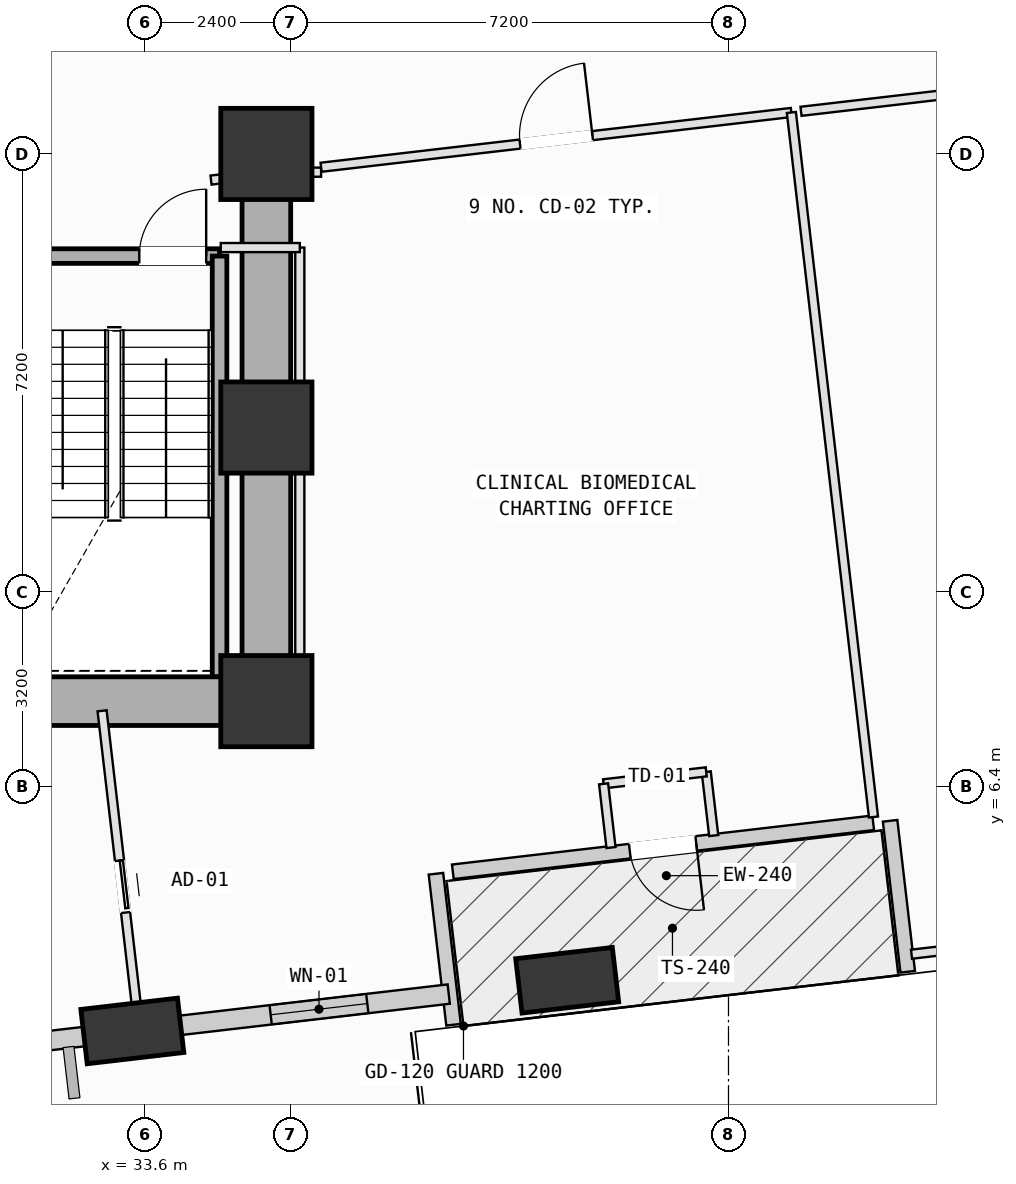
"""IFC4 building model, lengths in metres.
Left out: names, types, materials, properties, quantities, classifications, styles, units other than length and angle.
Written with IfcOpenShell. Run it as: python <this file> out.ifc"""

import sys

from ifc_helpers import new_model, si_unit, direction, frame, frame_2d, origin, origin_2d, place, context, subcontext, project, spatial, rectangle, extrude, element, fill, save


model = new_model("IFC4")
c1 = context("Model", 3, precision=1e-05, world=origin(), true_north=direction((0.0, 1.0)))
c2 = subcontext(c1, "Body", "Model", "MODEL_VIEW")
j1 = project(units=[si_unit("LENGTHUNIT", "METRE"), si_unit("PLANEANGLEUNIT", "RADIAN")], contexts=[c1])
p1 = place(None, origin())
s1 = spatial("IfcSite", under=j1, at=p1, CompositionType="ELEMENT")
p2 = place(p1, origin())
s2 = spatial("IfcBuilding", under=s1, at=p2, CompositionType="ELEMENT")
p3 = place(p2, frame((0.0, 0.0, 51.0)))
s3 = spatial("IfcBuildingStorey", under=s2, at=p3, CompositionType="ELEMENT", Elevation=51.0)
for number, where, z_axis, x_axis in (
    (1, (35.6, 7.8, 0.0), (0.0, 0.0, 1.0), (1.0, 0.0, 0.0)),
    (2, (35.6, 12.3, 0.0), (0.0, 0.0, 1.0), (1.0, 0.0, 0.0)),
    (3, (35.6, 16.8, 0.0), (0.0, 0.0, 1.0), (1.0, 0.0, 0.0)),
):
    element("IfcColumn", number, at=place(p3, frame(where, z_axis=z_axis, x_axis=x_axis)), inside=s3, PredefinedType="COLUMN", context=c2, shape_type="SweptSolid", body=[
        extrude(rectangle(XDim=1.5, YDim=1.5, at=origin_2d()), origin(), (0.0, 0.0, 1.0), 4.0),
    ])
p4 = place(p3, frame((33.396, 2.375, 0.002), z_axis=(0.092515382804, -6.0825367e-05, 0.995711253449), x_axis=(-0.114654270311, 0.993347681302, 0.010713652585)))
e4 = element("IfcColumn", 4, at=p4, inside=s3, PredefinedType="COLUMN", context=c2, shape_type="SweptSolid", body=[
    extrude(rectangle(XDim=1.6, YDim=0.9, at=origin_2d()), origin(), (0.0, 0.0, 1.0), 4.014),
])
p5 = place(p3, frame((40.547, 3.209, 0.002), z_axis=(0.088856765696, 0.029436464474, 0.995609345953), x_axis=(-0.421803367053, 0.906622532137, 0.010839915315)))
e5 = element("IfcColumn", 5, at=p5, inside=s3, PredefinedType="COLUMN", context=c2, shape_type="SweptSolid", body=[
    extrude(rectangle(XDim=1.6, YDim=0.9, at=origin_2d()), origin(), (0.0, 0.0, 1.0), 4.014),
])
p6 = place(p3, frame((45.58, 5.8, 0.0), z_axis=(0.0, 0.0, 1.0), x_axis=(-0.993269328475, -0.115827635352, 0.0)))
e6 = element("IfcWall", 6, at=p6, inside=s3, PredefinedType="SOLIDWALL", context=c2, shape_type="SweptSolid", body=[
    extrude(rectangle(XDim=6.96, YDim=0.24, at=frame_2d((3.48, 0.0))), origin(), (0.0, 0.0, 1.0), 3.165),
])
p7 = place(p6, frame((2.93, 0.0, 0.0)))
e7 = element("IfcOpeningElement", 7, at=p7, cuts=e6, PredefinedType="OPENING", context=c2, shape_type="SweptSolid", body=[
    extrude(rectangle(XDim=1.1, YDim=2.15, at=frame_2d((0.55, 1.075))), frame((0.0, 0.13, 0.0), z_axis=(0.0, -1.0, 0.0), x_axis=(1.0, 0.0, 0.0)), (0.0, 0.0, 1.0), 0.26),
])
p8 = place(p3, frame((38.389, 4.961, 0.0), z_axis=(0.0, 0.0, 1.0), x_axis=(0.115810052607, -0.993271378685, 0.0)))
e8 = element("IfcWall", 8, at=p8, inside=s3, PredefinedType="SOLIDWALL", context=c2, shape_type="SweptSolid", body=[
    extrude(rectangle(XDim=2.5, YDim=0.24, at=frame_2d((1.25, 0.0))), origin(), (0.0, 0.0, 1.0), 3.165),
])
p9 = place(p3, frame((46.148, 3.349, 0.0), z_axis=(0.0, 0.0, 1.0), x_axis=(-0.115821286172, 0.993270068848, 0.0)))
e9 = element("IfcWall", 9, at=p9, inside=s3, PredefinedType="SOLIDWALL", context=c2, shape_type="SweptSolid", body=[
    extrude(rectangle(XDim=2.5, YDim=0.24, at=frame_2d((1.25, 0.0))), origin(), (0.0, 0.0, 1.0), 3.165),
])
p10 = place(p3, frame((32.976, 2.326, 0.0), z_axis=(0.0, 0.0, 1.0), x_axis=(-0.99327275312, -0.115798263844, 0.0)))
e10 = element("IfcWall", 10, at=p10, inside=s3, PredefinedType="SOLIDWALL", context=c2, shape_type="SweptSolid", body=[
    extrude(rectangle(XDim=5.99, YDim=0.32, at=frame_2d((2.995, 0.0))), origin(), (0.0, 0.0, 1.0), 3.165),
])
p11 = place(p10, frame((2.394, 0.0, 0.75)))
e11 = element("IfcOpeningElement", 11, at=p11, cuts=e10, PredefinedType="OPENING", context=c2, shape_type="SweptSolid", body=[
    extrude(rectangle(XDim=1.2, YDim=1.75, at=frame_2d((0.6, 0.875))), frame((0.0, 0.17, 0.0), z_axis=(0.0, -1.0, 0.0), x_axis=(1.0, 0.0, 0.0)), (0.0, 0.0, 1.0), 0.34),
])
p12 = place(p10, frame((4.256, 0.0, 0.75)))
e12 = element("IfcOpeningElement", 12, at=p12, cuts=e10, PredefinedType="OPENING", context=c2, shape_type="SweptSolid", body=[
    extrude(rectangle(XDim=1.2, YDim=1.75, at=frame_2d((0.6, 0.875))), frame((0.0, 0.17, 0.0), z_axis=(0.0, -1.0, 0.0), x_axis=(1.0, 0.0, 0.0)), (0.0, 0.0, 1.0), 0.34),
])
p13 = place(p3, frame((38.599, 2.982, 0.0), z_axis=(0.0, 0.0, 1.0), x_axis=(-0.993273351727, -0.115793129113, 0.0)))
e13 = element("IfcWall", 13, at=p13, inside=s3, PredefinedType="SOLIDWALL", context=c2, shape_type="SweptSolid", body=[
    extrude(rectangle(XDim=4.447, YDim=0.32, at=frame_2d((2.223, 0.0))), origin(), (0.0, 0.0, 1.0), 3.165),
])
p14 = place(p13, frame((1.348, 0.0, 0.75)))
e14 = element("IfcOpeningElement", 14, at=p14, cuts=e13, PredefinedType="OPENING", context=c2, shape_type="SweptSolid", body=[
    extrude(rectangle(XDim=1.6, YDim=1.95, at=frame_2d((0.8, 0.975))), frame((0.0, 0.17, 0.0), z_axis=(0.0, -1.0, 0.0), x_axis=(1.0, 0.0, 0.0)), (0.0, 0.0, 1.0), 0.34),
])
p15 = place(p3, frame((31.37, 15.12, 0.0), z_axis=(0.0, 0.0, 1.0), x_axis=(1.0, 0.0, 0.0)))
e15 = element("IfcWall", 15, at=p15, inside=s3, PredefinedType="SOLIDWALL", context=c2, shape_type="SweptSolid", body=[
    extrude(rectangle(XDim=3.46, YDim=0.24, at=frame_2d((1.73, 0.0))), origin(), (0.0, 0.0, 1.0), 3.78),
])
p16 = place(p15, frame((2.14, 0.0, 0.0)))
e16 = element("IfcOpeningElement", 16, at=p16, cuts=e15, PredefinedType="OPENING", context=c2, shape_type="SweptSolid", body=[
    extrude(rectangle(XDim=1.1, YDim=2.15, at=frame_2d((0.55, 1.075))), frame((0.0, 0.13, 0.0), z_axis=(0.0, -1.0, 0.0), x_axis=(1.0, 0.0, 0.0)), (0.0, 0.0, 1.0), 0.26),
])
p17 = place(p3, frame((34.83, 15.12, 0.0), z_axis=(0.0, 0.0, 1.0), x_axis=(0.0, -1.0, 0.0)))
e17 = element("IfcWall", 17, at=p17, inside=s3, PredefinedType="SOLIDWALL", context=c2, shape_type="SweptSolid", body=[
    extrude(rectangle(XDim=6.92, YDim=0.24, at=frame_2d((3.46, 0.0))), origin(), (0.0, 0.0, 1.0), 3.78),
])
p18 = place(p3, frame((24.8, 7.8, 0.0), z_axis=(0.0, 0.0, 1.0), x_axis=(1.0, 0.0, 0.0)))
e18 = element("IfcWall", 18, at=p18, inside=s3, PredefinedType="SHEAR", context=c2, shape_type="SweptSolid", body=[
    extrude(rectangle(XDim=10.8, YDim=0.8, at=frame_2d((5.4, 0.0))), origin(), (0.0, 0.0, 1.0), 3.78),
])
p19 = place(p3, frame((35.6, 7.8, 0.0), z_axis=(0.0, 0.0, 1.0), x_axis=(0.0, 1.0, 0.0)))
e19 = element("IfcWall", 19, at=p19, inside=s3, PredefinedType="SHEAR", context=c2, shape_type="SweptSolid", body=[
    extrude(rectangle(XDim=9.0, YDim=0.8, at=frame_2d((4.5, 0.0))), origin(), (0.0, 0.0, 1.0), 3.78),
])
p20 = place(p3, frame((33.536, 2.16, 0.0), z_axis=(0.0, 0.0, 1.0), x_axis=(-0.993323124869, -0.115365374356, 0.0)))
e20 = element("IfcWall", 20, at=p20, inside=s3, PredefinedType="PARTITIONING", context=c2, shape_type="SweptSolid", body=[
    extrude(rectangle(XDim=0.538, YDim=0.15, at=frame_2d((0.269, 0.0))), origin(), (0.0, 0.0, 1.0), 3.165),
])
p21 = place(p3, frame((32.898, 7.641, 0.0), z_axis=(0.0, 0.0, 1.0), x_axis=(0.115606435858, -0.99329509814, 0.0)))
e21 = element("IfcWall", 21, at=p21, inside=s3, PredefinedType="PARTITIONING", context=c2, shape_type="SweptSolid", body=[
    extrude(rectangle(XDim=5.518, YDim=0.15, at=frame_2d((2.759, 0.0))), origin(), (0.0, 0.0, 1.0), 3.78),
])
p22 = place(p21, frame((2.48, 0.0, 0.0)))
e22 = element("IfcOpeningElement", 22, at=p22, cuts=e21, PredefinedType="OPENING", context=c2, shape_type="SweptSolid", body=[
    extrude(rectangle(XDim=0.86, YDim=2.06, at=frame_2d((0.43, 1.03))), frame((0.0, 0.085, 0.0), z_axis=(0.0, -1.0, 0.0), x_axis=(1.0, 0.0, 0.0)), (0.0, 0.0, 1.0), 0.17),
])
p23 = place(p3, frame((35.6, 7.5, 0.0), z_axis=(0.0, 0.0, 1.0), x_axis=(1.0, 0.0, 0.0)))
e23 = element("IfcWall", 23, at=p23, inside=s3, PredefinedType="PARTITIONING", context=c2, shape_type="SweptSolid", body=[
    extrude(rectangle(XDim=0.55, YDim=0.15, at=frame_2d((0.275, 0.0))), origin(), (0.0, 0.0, 1.0), 3.78),
])
p24 = place(p3, frame((36.15, 7.5, 0.0), z_axis=(0.0, 0.0, 1.0), x_axis=(0.0, 1.0, 0.0)))
e24 = element("IfcWall", 24, at=p24, inside=s3, PredefinedType="PARTITIONING", context=c2, shape_type="SweptSolid", body=[
    extrude(rectangle(XDim=7.76, YDim=0.15, at=frame_2d((3.88, 0.0))), origin(), (0.0, 0.0, 1.0), 3.78),
])
p25 = place(p3, frame((36.15, 15.26, 0.0), z_axis=(0.0, 0.0, 1.0), x_axis=(-1.0, 0.0, 0.0)))
e25 = element("IfcWall", 25, at=p25, inside=s3, PredefinedType="PARTITIONING", context=c2, shape_type="SweptSolid", body=[
    extrude(rectangle(XDim=1.3, YDim=0.15, at=frame_2d((0.65, 0.0))), origin(), (0.0, 0.0, 1.0), 3.78),
])
p26 = place(p3, frame((34.69, 16.37, 0.0), z_axis=(0.0, 0.0, 1.0), x_axis=(0.993332795397, 0.115282078349, 0.0)))
e26 = element("IfcWall", 26, at=p26, inside=s3, PredefinedType="PARTITIONING", context=c2, shape_type="SweptSolid", body=[
    extrude(rectangle(XDim=1.127, YDim=0.15, at=frame_2d((0.563, 0.0))), origin(), (0.0, 0.0, 1.0), 2.865),
])
p27 = place(p3, frame((35.809, 16.5, 0.0), z_axis=(0.0, 0.0, 1.0), x_axis=(1.0, 0.0, 0.0)))
e27 = element("IfcWall", 27, at=p27, inside=s3, PredefinedType="PARTITIONING", context=c2, shape_type="SweptSolid", body=[
    extrude(rectangle(XDim=0.691, YDim=0.15, at=frame_2d((0.345, 0.0))), origin(), (0.0, 0.0, 1.0), 2.865),
])
p28 = place(p3, frame((36.5, 16.581, 0.0), z_axis=(0.0, 0.0, 1.0), x_axis=(0.993283935169, 0.115702308251, 0.0)))
e28 = element("IfcWall", 28, at=p28, inside=s3, PredefinedType="PARTITIONING", context=c2, shape_type="SweptSolid", body=[
    extrude(rectangle(XDim=7.786, YDim=0.15, at=frame_2d((3.893, 0.0))), origin(), (0.0, 0.0, 1.0), 3.78),
])
p29 = place(p28, frame((3.293, 0.0, 0.0)))
e29 = element("IfcOpeningElement", 29, at=p29, cuts=e28, PredefinedType="OPENING", context=c2, shape_type="SweptSolid", body=[
    extrude(rectangle(XDim=1.2, YDim=2.15, at=frame_2d((0.6, 1.075))), frame((0.0, 0.085, 0.0), z_axis=(0.0, -1.0, 0.0), x_axis=(1.0, 0.0, 0.0)), (0.0, 0.0, 1.0), 0.17),
])
p30 = place(p3, frame((44.234, 17.482, 0.0), z_axis=(0.0, 0.0, 1.0), x_axis=(0.115809127061, -0.993271486598, 0.0)))
e30 = element("IfcWall", 30, at=p30, inside=s3, PredefinedType="PARTITIONING", context=c2, shape_type="SweptSolid", body=[
    extrude(rectangle(XDim=11.667, YDim=0.15, at=frame_2d((5.833, 0.0))), origin(), (0.0, 0.0, 1.0), 3.78),
])
p31 = place(p3, frame((42.957, 5.589, 0.0), z_axis=(0.0, 0.0, 1.0), x_axis=(-0.116626428291, 0.993175853625, 0.0)))
e31 = element("IfcWall", 31, at=p31, inside=s3, PredefinedType="PARTITIONING", context=c2, shape_type="SweptSolid", body=[
    extrude(rectangle(XDim=1.055, YDim=0.15, at=frame_2d((0.527, 0.0))), origin(), (0.0, 0.0, 1.0), 3.78),
])
p32 = place(p3, frame((42.834, 6.637, 0.0), z_axis=(0.0, 0.0, 1.0), x_axis=(-0.993257074845, -0.115932666966, 0.0)))
e32 = element("IfcWall", 32, at=p32, inside=s3, PredefinedType="PARTITIONING", context=c2, shape_type="SweptSolid", body=[
    extrude(rectangle(XDim=1.699, YDim=0.15, at=frame_2d((0.85, 0.0))), origin(), (0.0, 0.0, 1.0), 3.78),
])
p33 = place(p3, frame((41.146, 6.44, 0.0), z_axis=(0.0, 0.0, 1.0), x_axis=(0.115713264087, -0.993282658922, 0.0)))
e33 = element("IfcWall", 33, at=p33, inside=s3, PredefinedType="PARTITIONING", context=c2, shape_type="SweptSolid", body=[
    extrude(rectangle(XDim=1.055, YDim=0.15, at=frame_2d((0.527, 0.0))), origin(), (0.0, 0.0, 1.0), 3.78),
])
p34 = place(p3, frame((34.209, 2.239, 0.0), z_axis=(0.0, 0.0, 1.0), x_axis=(-0.993240491089, -0.116074660716, 0.0)))
e34 = element("IfcWall", 34, at=p34, inside=s3, PredefinedType="PARTITIONING", context=c2, shape_type="SweptSolid", body=[
    extrude(rectangle(XDim=0.517, YDim=0.15, at=frame_2d((0.259, 0.0))), origin(), (0.0, 0.0, 1.0), 3.165),
])
p35 = place(p3, frame((44.393, 17.501, 0.0), z_axis=(0.0, 0.0, 1.0), x_axis=(0.993276639016, 0.115764927265, 0.0)))
e35 = element("IfcWall", 35, at=p35, inside=s3, PredefinedType="PARTITIONING", context=c2, shape_type="SweptSolid", body=[
    extrude(rectangle(XDim=12.24, YDim=0.15, at=frame_2d((6.12, 0.0))), origin(), (0.0, 0.0, 1.0), 3.78),
])
p36 = place(p35, frame((5.52, 0.0, 0.0)))
e36 = element("IfcOpeningElement", 36, at=p36, cuts=e35, PredefinedType="OPENING", context=c2, shape_type="SweptSolid", body=[
    extrude(rectangle(XDim=1.2, YDim=2.15, at=frame_2d((0.6, 1.075))), frame((0.0, 0.085, 0.0), z_axis=(0.0, -1.0, 0.0), x_axis=(1.0, 0.0, 0.0)), (0.0, 0.0, 1.0), 0.17),
])
p37 = place(p3, frame((48.504, 3.905, 0.0), z_axis=(0.0, 0.0, 1.0), x_axis=(-0.993289881522, -0.115651248445, 0.0)))
e37 = element("IfcWall", 37, at=p37, inside=s3, PredefinedType="PARTITIONING", context=c2, shape_type="SweptSolid", body=[
    extrude(rectangle(XDim=2.309, YDim=0.15, at=frame_2d((1.155, 0.0))), origin(), (0.0, 0.0, 1.0), 3.145),
])
p38 = place(p7, origin())
e38 = element("IfcDoor", 38, at=p38, inside=s3, OperationType="SINGLE_SWING_LEFT", PredefinedType="DOOR", context=c2, shape_type="SweptSolid", body=[
    extrude(rectangle(XDim=1.1, YDim=2.15, at=frame_2d((0.55, 1.075))), frame((0.0, 0.025, 0.0), z_axis=(0.0, -1.0, 0.0), x_axis=(1.0, 0.0, 0.0)), (0.0, 0.0, 1.0), 0.05),
])
fill(e7, e38)
p39 = place(p14, origin())
e39 = element("IfcWindow", 39, at=p39, inside=s3, PartitioningType="SINGLE_PANEL", PredefinedType="WINDOW", context=c2, shape_type="SweptSolid", body=[
    extrude(rectangle(XDim=1.6, YDim=1.95, at=frame_2d((0.8, 0.975))), frame((0.0, 0.03, 0.0), z_axis=(0.0, -1.0, 0.0), x_axis=(1.0, 0.0, 0.0)), (0.0, 0.0, 1.0), 0.06),
])
fill(e14, e39)
p40 = place(p16, origin())
e40 = element("IfcDoor", 40, at=p40, inside=s3, OperationType="SINGLE_SWING_RIGHT", PredefinedType="DOOR", context=c2, shape_type="SweptSolid", body=[
    extrude(rectangle(XDim=1.1, YDim=2.15, at=frame_2d((0.55, 1.075))), frame((0.0, 0.025, 0.0), z_axis=(0.0, -1.0, 0.0), x_axis=(1.0, 0.0, 0.0)), (0.0, 0.0, 1.0), 0.05),
])
fill(e16, e40)
p41 = place(p29, origin())
e41 = element("IfcDoor", 41, at=p41, inside=s3, OperationType="SINGLE_SWING_RIGHT", PredefinedType="DOOR", context=c2, shape_type="SweptSolid", body=[
    extrude(rectangle(XDim=1.2, YDim=2.15, at=frame_2d((0.6, 1.075))), frame((0.0, 0.025, 0.0), z_axis=(0.0, -1.0, 0.0), x_axis=(1.0, 0.0, 0.0)), (0.0, 0.0, 1.0), 0.05),
])
fill(e29, e41)
p42 = place(p22, origin())
e42 = element("IfcDoor", 42, at=p42, inside=s3, OperationType="SLIDING_TO_LEFT", PredefinedType="DOOR", context=c2, shape_type="SweptSolid", body=[
    extrude(rectangle(XDim=0.86, YDim=2.06, at=frame_2d((0.43, 1.03))), frame((0.0, 0.025, 0.0), z_axis=(0.0, -1.0, 0.0), x_axis=(1.0, 0.0, 0.0)), (0.0, 0.0, 1.0), 0.05),
])
fill(e22, e42)
save(model, sys.argv[1])
